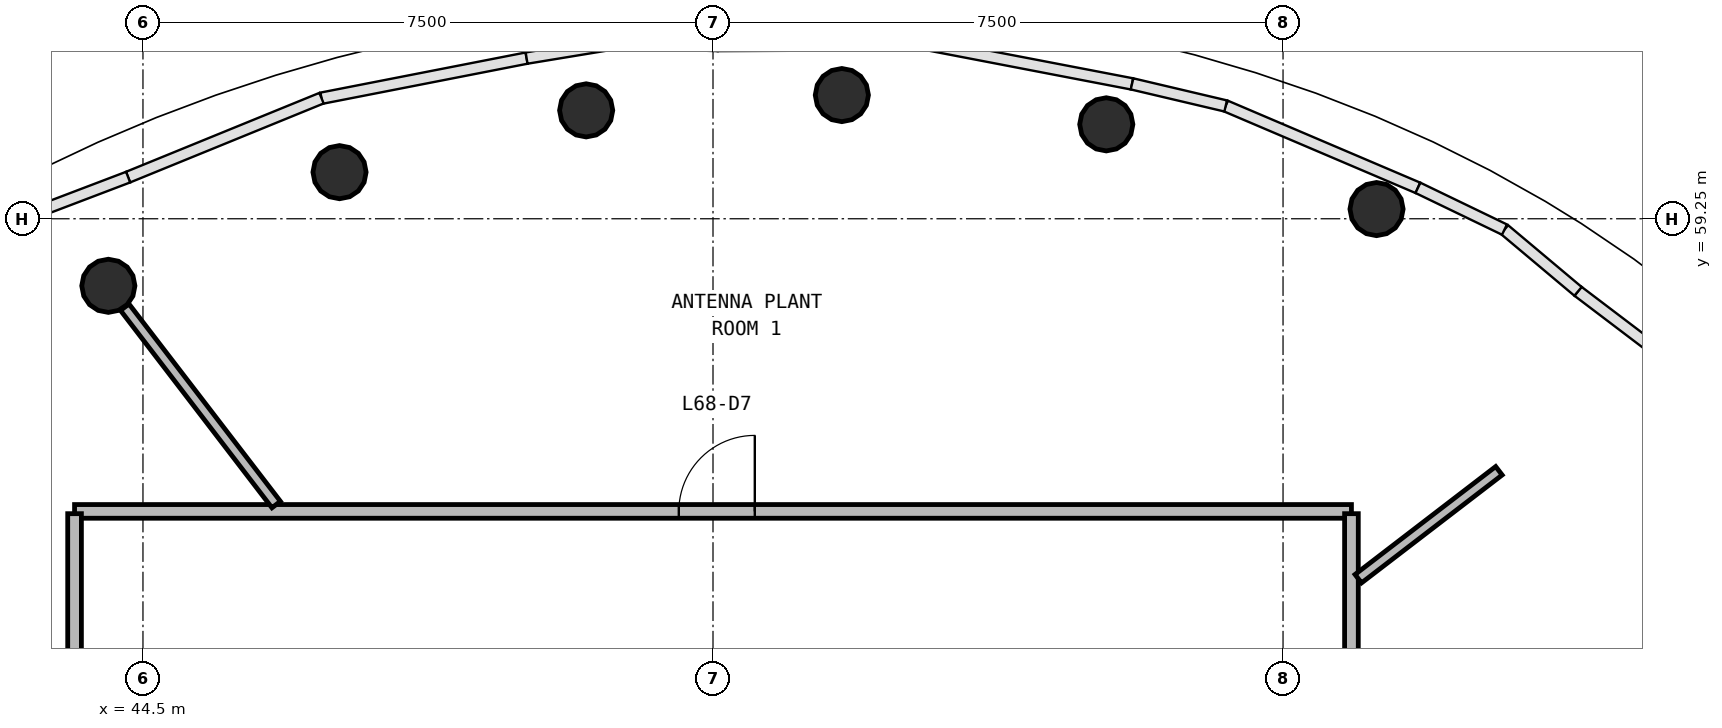
"""IFC4 building model, lengths in metres.
Left out: names, types, materials, properties, quantities, classifications, styles, units other than length and angle.
Written with IfcOpenShell. Run it as: python <this file> out.ifc"""

import sys

from ifc_helpers import new_model, si_unit, direction, frame, frame_2d, origin, origin_2d, place, context, subcontext, project, spatial, rectangle, circle, extrude, source, transform, mapped, element, fill, save


model = new_model("IFC4")
c1 = context("Model", 3, precision=1e-05, world=origin(), true_north=direction((0.0, 1.0)))
c2 = subcontext(c1, "Body", "Model", "MODEL_VIEW")
j1 = project(units=[si_unit("LENGTHUNIT", "METRE"), si_unit("PLANEANGLEUNIT", "RADIAN")], contexts=[c1])
p1 = place(None, origin())
s1 = spatial("IfcSite", under=j1, at=p1, CompositionType="ELEMENT")
p2 = place(p1, origin())
s2 = spatial("IfcBuilding", under=s1, at=p2, CompositionType="ELEMENT")
p3 = place(p2, frame((0.0, 0.0, 276.6)))
s3 = spatial("IfcBuildingStorey", under=s2, at=p3, CompositionType="ELEMENT", Elevation=276.6)
m1 = source(origin(), c2, "Body", "SweptSolid", [
    extrude(circle(Radius=0.35, at=origin_2d()), origin(), (0.0, 0.0, 1.0), 3.908),
])
p4 = place(p3, frame((60.73, 59.377, 0.159), z_axis=(-0.270812901307, -0.352962604933, 0.895587947666), x_axis=(0.793380296063, -0.608726297953, 0.0)))
e1 = element("IfcColumn", 1, at=p4, inside=s3, PredefinedType="COLUMN", context=c2, shape_type="MappedRepresentation", body=[
    mapped(m1, transform((0.0, 0.0, 0.0), scale=1.0)),
])
m2 = source(origin(), c2, "Body", "SweptSolid", [
    extrude(circle(Radius=0.35, at=origin_2d()), origin(), (0.0, 0.0, 1.0), 3.834),
])
p5 = place(p3, frame((57.175, 60.492, 0.146), z_axis=(-0.156215845153, -0.376943166515, 0.912967939712), x_axis=(0.923809441409, -0.382852603443, 0.0)))
e2 = element("IfcColumn", 2, at=p5, inside=s3, PredefinedType="COLUMN", context=c2, shape_type="MappedRepresentation", body=[
    mapped(m2, transform((0.0, 0.0, 0.0), scale=1.0)),
])
m3 = source(origin(), c2, "Body", "SweptSolid", [
    extrude(circle(Radius=0.35, at=origin_2d()), origin(), (0.0, 0.0, 1.0), 3.784),
])
p6 = place(p3, frame((53.695, 60.877, 0.136), z_axis=(-0.049674543277, -0.377074942147, 0.924849678464), x_axis=(0.99143407694, -0.130608081992, 0.0)))
e3 = element("IfcColumn", 3, at=p6, inside=s3, PredefinedType="COLUMN", context=c2, shape_type="MappedRepresentation", body=[
    mapped(m3, transform((0.0, 0.0, 0.0), scale=1.0)),
])
m4 = source(origin(), c2, "Body", "SweptSolid", [
    extrude(circle(Radius=0.35, at=origin_2d()), origin(), (0.0, 0.0, 1.0), 3.759),
])
p7 = place(p3, frame((50.331, 60.676, 0.131), z_axis=(0.047605122797, -0.361746976777, 0.93106008242), x_axis=(0.991451871974, 0.130472930369, 0.0)))
e4 = element("IfcColumn", 4, at=p7, inside=s3, PredefinedType="COLUMN", context=c2, shape_type="MappedRepresentation", body=[
    mapped(m4, transform((0.0, 0.0, 0.0), scale=1.0)),
])
m5 = source(origin(), c2, "Body", "SweptSolid", [
    extrude(circle(Radius=0.35, at=origin_2d()), origin(), (0.0, 0.0, 1.0), 3.747),
])
p8 = place(p3, frame((47.086, 59.863, 0.128), z_axis=(0.136577604612, -0.329715018769, 0.934149112464), x_axis=(0.923874408562, 0.38269580244, 0.0)))
e5 = element("IfcColumn", 5, at=p8, inside=s3, PredefinedType="COLUMN", context=c2, shape_type="MappedRepresentation", body=[
    mapped(m5, transform((0.0, 0.0, 0.0), scale=1.0)),
])
m6 = source(origin(), c2, "Body", "SweptSolid", [
    extrude(circle(Radius=0.35, at=origin_2d()), origin(), (0.0, 0.0, 1.0), 3.739),
])
p9 = place(p3, frame((44.044, 58.368, 0.126), z_axis=(0.21405361087, -0.278961874812, 0.936141722217), x_axis=(0.793355214176, 0.608758986907, 0.0)))
e6 = element("IfcColumn", 6, at=p9, inside=s3, PredefinedType="COLUMN", context=c2, shape_type="MappedRepresentation", body=[
    mapped(m6, transform((0.0, 0.0, 0.0), scale=1.0)),
])
p10 = place(p3, frame((43.6, 55.4, 0.0), z_axis=(0.0, 0.0, 1.0), x_axis=(1.0, 0.0, 0.0)))
e7 = element("IfcWall", 7, at=p10, inside=s3, PredefinedType="PARTITIONING", context=c2, shape_type="SweptSolid", body=[
    extrude(rectangle(XDim=16.8, YDim=0.18, at=frame_2d((8.4, 0.0))), origin(), (0.0, 0.0, 1.0), 2.62),
])
p11 = place(p10, frame((7.95, 0.0, 0.0)))
e8 = element("IfcOpeningElement", 8, at=p11, cuts=e7, PredefinedType="OPENING", context=c2, shape_type="SweptSolid", body=[
    extrude(rectangle(XDim=1.0, YDim=2.1, at=frame_2d((0.5, 1.05))), frame((0.0, 0.1, 0.0), z_axis=(0.0, -1.0, 0.0), x_axis=(1.0, 0.0, 0.0)), (0.0, 0.0, 1.0), 0.2),
])
p12 = place(p3, frame((60.4, 55.37, 0.0), z_axis=(0.0, 0.0, 1.0), x_axis=(0.0, -1.0, 0.0)))
e9 = element("IfcWall", 9, at=p12, inside=s3, PredefinedType="PARTITIONING", context=c2, shape_type="SweptSolid", body=[
    extrude(rectangle(XDim=14.74, YDim=0.18, at=frame_2d((7.37, 0.0))), origin(), (0.0, 0.0, 1.0), 2.62),
])
p13 = place(p12, frame((6.89, 0.0, 0.0)))
e10 = element("IfcOpeningElement", 10, at=p13, cuts=e9, PredefinedType="OPENING", context=c2, shape_type="SweptSolid", body=[
    extrude(rectangle(XDim=1.0, YDim=2.1, at=frame_2d((0.5, 1.05))), frame((0.0, 0.1, 0.0), z_axis=(0.0, -1.0, 0.0), x_axis=(1.0, 0.0, 0.0)), (0.0, 0.0, 1.0), 0.2),
])
p14 = place(p3, frame((43.6, 40.63, 0.0), z_axis=(0.0, 0.0, 1.0), x_axis=(0.0, 1.0, 0.0)))
e11 = element("IfcWall", 11, at=p14, inside=s3, PredefinedType="PARTITIONING", context=c2, shape_type="SweptSolid", body=[
    extrude(rectangle(XDim=14.74, YDim=0.18, at=frame_2d((7.37, 0.0))), origin(), (0.0, 0.0, 1.0), 2.62),
])
p15 = place(p14, frame((6.89, 0.0, 0.0)))
e12 = element("IfcOpeningElement", 12, at=p15, cuts=e11, PredefinedType="OPENING", context=c2, shape_type="SweptSolid", body=[
    extrude(rectangle(XDim=1.0, YDim=2.1, at=frame_2d((0.5, 1.05))), frame((0.0, 0.1, 0.0), z_axis=(0.0, -1.0, 0.0), x_axis=(1.0, 0.0, 0.0)), (0.0, 0.0, 1.0), 0.2),
])
p16 = place(p3, frame((60.49, 54.515, 0.0), z_axis=(0.0, 0.0, 1.0), x_axis=(0.793370454613, 0.608739124542, 0.0)))
e13 = element("IfcWall", 13, at=p16, inside=s3, PredefinedType="PARTITIONING", context=c2, shape_type="SweptSolid", body=[
    extrude(rectangle(XDim=2.333, YDim=0.14, at=frame_2d((1.166, 0.0))), origin(), (0.0, 0.0, 1.0), 2.62),
])
p17 = place(p3, frame((46.253, 55.49, 0.0), z_axis=(0.0, 0.0, 1.0), x_axis=(-0.608736894437, 0.793372165728, 0.0)))
e14 = element("IfcWall", 14, at=p17, inside=s3, PredefinedType="PARTITIONING", context=c2, shape_type="SweptSolid", body=[
    extrude(rectangle(XDim=3.273, YDim=0.14, at=frame_2d((1.636, 0.0))), origin(), (0.0, 0.0, 1.0), 2.62),
])
m7 = source(origin(), c2, "Body", "SweptSolid", [
    extrude(rectangle(XDim=1.0, YDim=2.1, at=frame_2d((0.5, 1.05))), frame((0.0, 0.025, 0.0), z_axis=(0.0, -1.0, 0.0), x_axis=(1.0, 0.0, 0.0)), (0.0, 0.0, 1.0), 0.05),
])
p18 = place(p11, origin())
e15 = element("IfcDoor", 15, at=p18, inside=s3, OperationType="SINGLE_SWING_RIGHT", PredefinedType="DOOR", context=c2, shape_type="MappedRepresentation", body=[
    mapped(m7, transform((0.0, 0.0, 0.0), scale=1.0)),
])
fill(e8, e15)
save(model, sys.argv[1])
